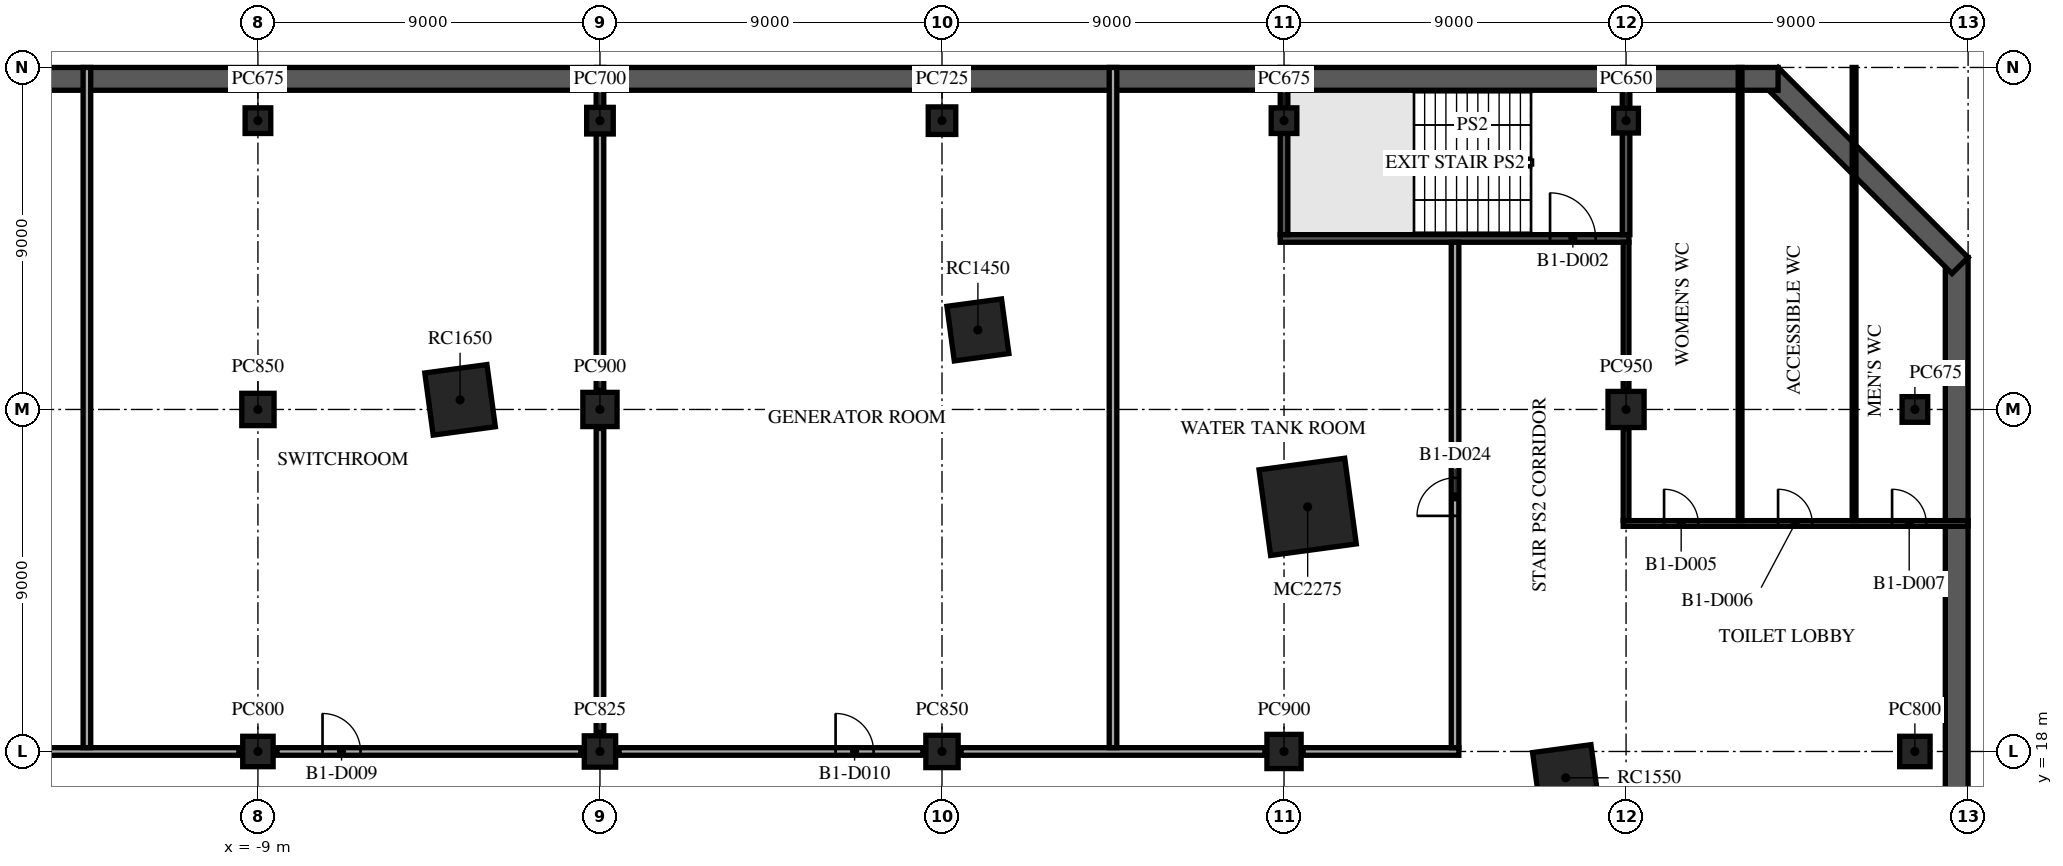
"""IFC4 building model, lengths in metres.
Left out: names, types, materials, properties, quantities, classifications, styles, units other than length and angle.
Written with IfcOpenShell. Run it as: python <this file> out.ifc"""

import sys

from ifc_helpers import new_model, si_unit, direction, frame, frame_2d, origin, origin_2d, place, context, subcontext, project, spatial, rectangle, extrude, element, fill, save


model = new_model("IFC4")
c1 = context("Model", 3, precision=1e-05, world=origin(), true_north=direction((0.0, 1.0)))
c2 = subcontext(c1, "Body", "Model", "MODEL_VIEW")
j1 = project(units=[si_unit("LENGTHUNIT", "METRE"), si_unit("PLANEANGLEUNIT", "RADIAN")], contexts=[c1])
p1 = place(None, origin())
s1 = spatial("IfcSite", under=j1, at=p1, CompositionType="ELEMENT")
p2 = place(p1, origin())
s2 = spatial("IfcBuilding", under=s1, at=p2, CompositionType="ELEMENT")
p3 = place(p2, frame((0.0, 0.0, -4.5)))
s3 = spatial("IfcBuildingStorey", under=s2, at=p3, CompositionType="ELEMENT", Elevation=-4.5)
p4 = place(p3, frame((35.7, -31.0, -0.3), z_axis=(0.0, 0.0, 1.0), x_axis=(0.0, 1.0, 0.0)))
e1 = element("IfcWall", 1, at=p4, inside=s3, PredefinedType="SOLIDWALL", context=c2, shape_type="SweptSolid", body=[
    extrude(rectangle(XDim=62.0, YDim=0.6, at=frame_2d((31.0, 0.0))), origin(), (0.0, 0.0, 1.0), 4.4),
])
p5 = place(p3, frame((35.788, 30.788, -0.3), z_axis=(0.0, 0.0, 1.0), x_axis=(-0.707106781187, 0.707106781187, 0.0)))
e2 = element("IfcWall", 2, at=p5, inside=s3, PredefinedType="SOLIDWALL", context=c2, shape_type="SweptSolid", body=[
    extrude(rectangle(XDim=7.071, YDim=0.6, at=frame_2d((3.536, 0.0))), origin(), (0.0, 0.0, 1.0), 4.4),
])
p6 = place(p3, frame((31.0, 35.7, -0.3), z_axis=(0.0, 0.0, 1.0), x_axis=(-1.0, 0.0, 0.0)))
e3 = element("IfcWall", 3, at=p6, inside=s3, PredefinedType="SOLIDWALL", context=c2, shape_type="SweptSolid", body=[
    extrude(rectangle(XDim=62.0, YDim=0.6, at=frame_2d((31.0, 0.0))), origin(), (0.0, 0.0, 1.0), 4.4),
])
p7 = place(p3, frame((-9.0, 18.0, 0.0), z_axis=(0.0, 0.0, 1.0), x_axis=(1.0, 0.0, 0.0)))
e4 = element("IfcColumn", 4, at=p7, inside=s3, PredefinedType="COLUMN", context=c2, shape_type="SweptSolid", body=[
    extrude(rectangle(XDim=0.8, YDim=0.8, at=origin_2d()), origin(), (0.0, 0.0, 1.0), 4.5),
])
p8 = place(p3, frame((-9.0, 27.0, 0.0), z_axis=(0.0, 0.0, 1.0), x_axis=(1.0, 0.0, 0.0)))
e5 = element("IfcColumn", 5, at=p8, inside=s3, PredefinedType="COLUMN", context=c2, shape_type="SweptSolid", body=[
    extrude(rectangle(XDim=0.85, YDim=0.85, at=origin_2d()), origin(), (0.0, 0.0, 1.0), 4.5),
])
p9 = place(p3, frame((-9.0, 34.6, 0.0), z_axis=(0.0, 0.0, 1.0), x_axis=(1.0, 0.0, 0.0)))
e6 = element("IfcColumn", 6, at=p9, inside=s3, PredefinedType="COLUMN", context=c2, shape_type="SweptSolid", body=[
    extrude(rectangle(XDim=0.675, YDim=0.675, at=origin_2d()), origin(), (0.0, 0.0, 1.0), 4.5),
])
p10 = place(p3, frame((0.0, 18.0, 0.0), z_axis=(0.0, 0.0, 1.0), x_axis=(1.0, 0.0, 0.0)))
e7 = element("IfcColumn", 7, at=p10, inside=s3, PredefinedType="COLUMN", context=c2, shape_type="SweptSolid", body=[
    extrude(rectangle(XDim=0.825, YDim=0.825, at=origin_2d()), origin(), (0.0, 0.0, 1.0), 4.5),
])
p11 = place(p3, frame((0.0, 27.0, 0.0), z_axis=(0.0, 0.0, 1.0), x_axis=(1.0, 0.0, 0.0)))
e8 = element("IfcColumn", 8, at=p11, inside=s3, PredefinedType="COLUMN", context=c2, shape_type="SweptSolid", body=[
    extrude(rectangle(XDim=0.9, YDim=0.9, at=origin_2d()), origin(), (0.0, 0.0, 1.0), 4.5),
])
p12 = place(p3, frame((0.0, 34.6, 0.0), z_axis=(0.0, 0.0, 1.0), x_axis=(1.0, 0.0, 0.0)))
e9 = element("IfcColumn", 9, at=p12, inside=s3, PredefinedType="COLUMN", context=c2, shape_type="SweptSolid", body=[
    extrude(rectangle(XDim=0.7, YDim=0.7, at=origin_2d()), origin(), (0.0, 0.0, 1.0), 4.5),
])
p13 = place(p3, frame((9.0, 18.0, 0.0), z_axis=(0.0, 0.0, 1.0), x_axis=(1.0, 0.0, 0.0)))
e10 = element("IfcColumn", 10, at=p13, inside=s3, PredefinedType="COLUMN", context=c2, shape_type="SweptSolid", body=[
    extrude(rectangle(XDim=0.85, YDim=0.85, at=origin_2d()), origin(), (0.0, 0.0, 1.0), 4.5),
])
p14 = place(p3, frame((9.0, 34.6, 0.0), z_axis=(0.0, 0.0, 1.0), x_axis=(1.0, 0.0, 0.0)))
e11 = element("IfcColumn", 11, at=p14, inside=s3, PredefinedType="COLUMN", context=c2, shape_type="SweptSolid", body=[
    extrude(rectangle(XDim=0.725, YDim=0.725, at=origin_2d()), origin(), (0.0, 0.0, 1.0), 4.5),
])
p15 = place(p3, frame((18.0, 18.0, 0.0), z_axis=(0.0, 0.0, 1.0), x_axis=(1.0, 0.0, 0.0)))
e12 = element("IfcColumn", 12, at=p15, inside=s3, PredefinedType="COLUMN", context=c2, shape_type="SweptSolid", body=[
    extrude(rectangle(XDim=0.9, YDim=0.9, at=origin_2d()), origin(), (0.0, 0.0, 1.0), 4.5),
])
p16 = place(p3, frame((18.0, 34.6, 0.0), z_axis=(0.0, 0.0, 1.0), x_axis=(1.0, 0.0, 0.0)))
e13 = element("IfcColumn", 13, at=p16, inside=s3, PredefinedType="COLUMN", context=c2, shape_type="SweptSolid", body=[
    extrude(rectangle(XDim=0.675, YDim=0.675, at=origin_2d()), origin(), (0.0, 0.0, 1.0), 4.5),
])
p17 = place(p3, frame((27.0, 27.0, 0.0), z_axis=(0.0, 0.0, 1.0), x_axis=(1.0, 0.0, 0.0)))
e14 = element("IfcColumn", 14, at=p17, inside=s3, PredefinedType="COLUMN", context=c2, shape_type="SweptSolid", body=[
    extrude(rectangle(XDim=0.95, YDim=0.95, at=origin_2d()), origin(), (0.0, 0.0, 1.0), 4.5),
])
p18 = place(p3, frame((27.0, 34.6, 0.0), z_axis=(0.0, 0.0, 1.0), x_axis=(1.0, 0.0, 0.0)))
e15 = element("IfcColumn", 15, at=p18, inside=s3, PredefinedType="COLUMN", context=c2, shape_type="SweptSolid", body=[
    extrude(rectangle(XDim=0.65, YDim=0.65, at=origin_2d()), origin(), (0.0, 0.0, 1.0), 4.5),
])
p19 = place(p3, frame((34.6, 18.0, 0.0), z_axis=(0.0, 0.0, 1.0), x_axis=(1.0, 0.0, 0.0)))
e16 = element("IfcColumn", 16, at=p19, inside=s3, PredefinedType="COLUMN", context=c2, shape_type="SweptSolid", body=[
    extrude(rectangle(XDim=0.8, YDim=0.8, at=origin_2d()), origin(), (0.0, 0.0, 1.0), 4.5),
])
p20 = place(p3, frame((34.6, 27.0, 0.0), z_axis=(0.0, 0.0, 1.0), x_axis=(1.0, 0.0, 0.0)))
e17 = element("IfcColumn", 17, at=p20, inside=s3, PredefinedType="COLUMN", context=c2, shape_type="SweptSolid", body=[
    extrude(rectangle(XDim=0.675, YDim=0.675, at=origin_2d()), origin(), (0.0, 0.0, 1.0), 4.5),
])
p21 = place(p3, frame((18.622, 24.437, 0.0), z_axis=(0.0, 0.0, 1.0), x_axis=(0.991001197216, 0.133853005627, 0.0)))
e18 = element("IfcColumn", 18, at=p21, inside=s3, PredefinedType="COLUMN", context=c2, shape_type="SweptSolid", body=[
    extrude(rectangle(XDim=2.275, YDim=2.275, at=origin_2d()), origin(), (0.0, 0.0, 1.0), 4.5),
])
p22 = place(p3, frame((9.945, 29.093, 0.0), z_axis=(0.0, 0.0, 1.0), x_axis=(0.991001197216, 0.133853005627, 0.0)))
e19 = element("IfcColumn", 19, at=p22, inside=s3, PredefinedType="COLUMN", context=c2, shape_type="SweptSolid", body=[
    extrude(rectangle(XDim=1.45, YDim=1.45, at=origin_2d()), origin(), (0.0, 0.0, 1.0), 4.5),
])
p23 = place(p3, frame((-3.681, 27.253, 0.0), z_axis=(0.0, 0.0, 1.0), x_axis=(0.991001197216, 0.133853005627, 0.0)))
e20 = element("IfcColumn", 20, at=p23, inside=s3, PredefinedType="COLUMN", context=c2, shape_type="SweptSolid", body=[
    extrude(rectangle(XDim=1.65, YDim=1.65, at=origin_2d()), origin(), (0.0, 0.0, 1.0), 4.5),
])
p24 = place(p3, frame((25.412, 17.307, 0.0), z_axis=(0.0, 0.0, 1.0), x_axis=(0.991001197216, 0.133853005627, 0.0)))
e21 = element("IfcColumn", 21, at=p24, inside=s3, PredefinedType="COLUMN", context=c2, shape_type="SweptSolid", body=[
    extrude(rectangle(XDim=1.55, YDim=1.55, at=origin_2d()), origin(), (0.0, 0.0, 1.0), 4.5),
])
p25 = place(p3, frame((-17.5, 18.0, 0.0), z_axis=(0.0, 0.0, 1.0), x_axis=(1.0, 0.0, 0.0)))
e22 = element("IfcWall", 22, at=p25, inside=s3, PredefinedType="PARTITIONING", context=c2, shape_type="SweptSolid", body=[
    extrude(rectangle(XDim=8.0, YDim=0.2, at=frame_2d((4.0, 0.0))), origin(), (0.0, 0.0, 1.0), 4.1),
])
p26 = place(p3, frame((-8.5, 18.0, 0.0), z_axis=(0.0, 0.0, 1.0), x_axis=(1.0, 0.0, 0.0)))
e23 = element("IfcWall", 23, at=p26, inside=s3, PredefinedType="PARTITIONING", context=c2, shape_type="SweptSolid", body=[
    extrude(rectangle(XDim=8.0, YDim=0.2, at=frame_2d((4.0, 0.0))), origin(), (0.0, 0.0, 1.0), 4.1),
])
p27 = place(p26, frame((1.2, 0.0, 0.0)))
e24 = element("IfcOpeningElement", 24, at=p27, cuts=e23, PredefinedType="OPENING", context=c2, shape_type="SweptSolid", body=[
    extrude(rectangle(XDim=1.0, YDim=2.1, at=frame_2d((0.5, 1.05))), frame((0.0, 0.11, 0.0), z_axis=(0.0, -1.0, 0.0), x_axis=(1.0, 0.0, 0.0)), (0.0, 0.0, 1.0), 0.22),
])
p28 = place(p3, frame((0.5, 18.0, 0.0), z_axis=(0.0, 0.0, 1.0), x_axis=(1.0, 0.0, 0.0)))
e25 = element("IfcWall", 25, at=p28, inside=s3, PredefinedType="PARTITIONING", context=c2, shape_type="SweptSolid", body=[
    extrude(rectangle(XDim=8.0, YDim=0.2, at=frame_2d((4.0, 0.0))), origin(), (0.0, 0.0, 1.0), 4.1),
])
p29 = place(p28, frame((5.7, 0.0, 0.0)))
e26 = element("IfcOpeningElement", 26, at=p29, cuts=e25, PredefinedType="OPENING", context=c2, shape_type="SweptSolid", body=[
    extrude(rectangle(XDim=1.0, YDim=2.1, at=frame_2d((0.5, 1.05))), frame((0.0, 0.11, 0.0), z_axis=(0.0, -1.0, 0.0), x_axis=(1.0, 0.0, 0.0)), (0.0, 0.0, 1.0), 0.22),
])
p30 = place(p3, frame((9.5, 18.0, 0.0), z_axis=(0.0, 0.0, 1.0), x_axis=(1.0, 0.0, 0.0)))
e27 = element("IfcWall", 27, at=p30, inside=s3, PredefinedType="PARTITIONING", context=c2, shape_type="SweptSolid", body=[
    extrude(rectangle(XDim=8.0, YDim=0.2, at=frame_2d((4.0, 0.0))), origin(), (0.0, 0.0, 1.0), 4.1),
])
p31 = place(p3, frame((18.5, 18.0, 0.0), z_axis=(0.0, 0.0, 1.0), x_axis=(1.0, 0.0, 0.0)))
e28 = element("IfcWall", 28, at=p31, inside=s3, PredefinedType="PARTITIONING", context=c2, shape_type="SweptSolid", body=[
    extrude(rectangle(XDim=4.1, YDim=0.2, at=frame_2d((2.05, 0.0))), origin(), (0.0, 0.0, 1.0), 4.1),
])
p32 = place(p3, frame((26.925, 24.0, 0.0), z_axis=(0.0, 0.0, 1.0), x_axis=(1.0, 0.0, 0.0)))
e29 = element("IfcWall", 29, at=p32, inside=s3, PredefinedType="PARTITIONING", context=c2, shape_type="SweptSolid", body=[
    extrude(rectangle(XDim=9.075, YDim=0.15, at=frame_2d((4.538, 0.0))), origin(), (0.0, 0.0, 1.0), 4.1),
])
p33 = place(p32, frame((1.075, 0.0, 0.0)))
e30 = element("IfcOpeningElement", 30, at=p33, cuts=e29, PredefinedType="OPENING", context=c2, shape_type="SweptSolid", body=[
    extrude(rectangle(XDim=0.9, YDim=2.1, at=frame_2d((0.45, 1.05))), frame((0.0, 0.085, 0.0), z_axis=(0.0, -1.0, 0.0), x_axis=(1.0, 0.0, 0.0)), (0.0, 0.0, 1.0), 0.17),
])
p34 = place(p32, frame((4.075, 0.0, 0.0)))
e31 = element("IfcOpeningElement", 31, at=p34, cuts=e29, PredefinedType="OPENING", context=c2, shape_type="SweptSolid", body=[
    extrude(rectangle(XDim=0.9, YDim=2.1, at=frame_2d((0.45, 1.05))), frame((0.0, 0.085, 0.0), z_axis=(0.0, -1.0, 0.0), x_axis=(1.0, 0.0, 0.0)), (0.0, 0.0, 1.0), 0.17),
])
p35 = place(p32, frame((7.075, 0.0, 0.0)))
e32 = element("IfcOpeningElement", 32, at=p35, cuts=e29, PredefinedType="OPENING", context=c2, shape_type="SweptSolid", body=[
    extrude(rectangle(XDim=0.9, YDim=2.1, at=frame_2d((0.45, 1.05))), frame((0.0, 0.085, 0.0), z_axis=(0.0, -1.0, 0.0), x_axis=(1.0, 0.0, 0.0)), (0.0, 0.0, 1.0), 0.17),
])
p36 = place(p3, frame((17.9, 31.5, 0.0), z_axis=(0.0, 0.0, 1.0), x_axis=(1.0, 0.0, 0.0)))
e33 = element("IfcWall", 33, at=p36, inside=s3, PredefinedType="PARTITIONING", context=c2, shape_type="SweptSolid", body=[
    extrude(rectangle(XDim=9.175, YDim=0.2, at=frame_2d((4.587, 0.0))), origin(), (0.0, 0.0, 1.0), 4.1),
])
p37 = place(p36, frame((7.1, 0.0, 0.0)))
e34 = element("IfcOpeningElement", 34, at=p37, cuts=e33, PredefinedType="OPENING", context=c2, shape_type="SweptSolid", body=[
    extrude(rectangle(XDim=1.2, YDim=2.1, at=frame_2d((0.6, 1.05))), frame((0.0, 0.11, 0.0), z_axis=(0.0, -1.0, 0.0), x_axis=(1.0, 0.0, 0.0)), (0.0, 0.0, 1.0), 0.22),
])
p38 = place(p3, frame((-13.5, 18.1, 0.0), z_axis=(0.0, 0.0, 1.0), x_axis=(0.0, 1.0, 0.0)))
e35 = element("IfcWall", 35, at=p38, inside=s3, PredefinedType="PARTITIONING", context=c2, shape_type="SweptSolid", body=[
    extrude(rectangle(XDim=17.9, YDim=0.2, at=frame_2d((8.95, 0.0))), origin(), (0.0, 0.0, 1.0), 4.1),
])
p39 = place(p3, frame((0.0, 18.5, 0.0), z_axis=(0.0, 0.0, 1.0), x_axis=(0.0, 1.0, 0.0)))
e36 = element("IfcWall", 36, at=p39, inside=s3, PredefinedType="PARTITIONING", context=c2, shape_type="SweptSolid", body=[
    extrude(rectangle(XDim=8.0, YDim=0.2, at=frame_2d((4.0, 0.0))), origin(), (0.0, 0.0, 1.0), 4.1),
])
p40 = place(p3, frame((0.0, 27.5, 0.0), z_axis=(0.0, 0.0, 1.0), x_axis=(0.0, 1.0, 0.0)))
e37 = element("IfcWall", 37, at=p40, inside=s3, PredefinedType="PARTITIONING", context=c2, shape_type="SweptSolid", body=[
    extrude(rectangle(XDim=8.5, YDim=0.2, at=frame_2d((4.25, 0.0))), origin(), (0.0, 0.0, 1.0), 4.1),
])
p41 = place(p3, frame((13.5, 18.1, 0.0), z_axis=(0.0, 0.0, 1.0), x_axis=(0.0, 1.0, 0.0)))
e38 = element("IfcWall", 38, at=p41, inside=s3, PredefinedType="PARTITIONING", context=c2, shape_type="SweptSolid", body=[
    extrude(rectangle(XDim=17.9, YDim=0.2, at=frame_2d((8.95, 0.0))), origin(), (0.0, 0.0, 1.0), 4.1),
])
p42 = place(p3, frame((18.0, 31.6, 0.0), z_axis=(0.0, 0.0, 1.0), x_axis=(0.0, 1.0, 0.0)))
e39 = element("IfcWall", 39, at=p42, inside=s3, PredefinedType="PARTITIONING", context=c2, shape_type="SweptSolid", body=[
    extrude(rectangle(XDim=4.4, YDim=0.2, at=frame_2d((2.2, 0.0))), origin(), (0.0, 0.0, 1.0), 4.1),
])
p43 = place(p3, frame((22.5, 18.1, 0.0), z_axis=(0.0, 0.0, 1.0), x_axis=(0.0, 1.0, 0.0)))
e40 = element("IfcWall", 40, at=p43, inside=s3, PredefinedType="PARTITIONING", context=c2, shape_type="SweptSolid", body=[
    extrude(rectangle(XDim=13.3, YDim=0.2, at=frame_2d((6.65, 0.0))), origin(), (0.0, 0.0, 1.0), 4.1),
])
p44 = place(p43, frame((6.1, 0.0, 0.0)))
e41 = element("IfcOpeningElement", 41, at=p44, cuts=e40, PredefinedType="OPENING", context=c2, shape_type="SweptSolid", body=[
    extrude(rectangle(XDim=1.0, YDim=2.1, at=frame_2d((0.5, 1.05))), frame((0.0, 0.11, 0.0), z_axis=(0.0, -1.0, 0.0), x_axis=(1.0, 0.0, 0.0)), (0.0, 0.0, 1.0), 0.22),
])
p45 = place(p3, frame((27.0, 24.075, 0.0), z_axis=(0.0, 0.0, 1.0), x_axis=(0.0, 1.0, 0.0)))
e42 = element("IfcWall", 42, at=p45, inside=s3, PredefinedType="PARTITIONING", context=c2, shape_type="SweptSolid", body=[
    extrude(rectangle(XDim=2.425, YDim=0.15, at=frame_2d((1.212, 0.0))), origin(), (0.0, 0.0, 1.0), 4.1),
])
p46 = place(p3, frame((27.0, 27.5, 0.0), z_axis=(0.0, 0.0, 1.0), x_axis=(0.0, 1.0, 0.0)))
e43 = element("IfcWall", 43, at=p46, inside=s3, PredefinedType="PARTITIONING", context=c2, shape_type="SweptSolid", body=[
    extrude(rectangle(XDim=3.9, YDim=0.15, at=frame_2d((1.95, 0.0))), origin(), (0.0, 0.0, 1.0), 4.1),
])
p47 = place(p3, frame((27.0, 31.6, 0.0), z_axis=(0.0, 0.0, 1.0), x_axis=(0.0, 1.0, 0.0)))
e44 = element("IfcWall", 44, at=p47, inside=s3, PredefinedType="PARTITIONING", context=c2, shape_type="SweptSolid", body=[
    extrude(rectangle(XDim=4.4, YDim=0.2, at=frame_2d((2.2, 0.0))), origin(), (0.0, 0.0, 1.0), 4.1),
])
for number, where, z_axis, x_axis in (
    (45, (30.0, 24.075, 0.0), (0.0, 0.0, 1.0), (0.0, 1.0, 0.0)),
    (46, (33.0, 24.075, 0.0), (0.0, 0.0, 1.0), (0.0, 1.0, 0.0)),
):
    element("IfcWall", number, at=place(p3, frame(where, z_axis=z_axis, x_axis=x_axis)), inside=s3, PredefinedType="PARTITIONING", context=c2, shape_type="SweptSolid", body=[
        extrude(rectangle(XDim=11.925, YDim=0.1, at=frame_2d((5.962, 0.0))), origin(), (0.0, 0.0, 1.0), 4.1),
    ])
p48 = place(p37, origin())
e47 = element("IfcDoor", 47, at=p48, inside=s3, OperationType="SINGLE_SWING_RIGHT", PredefinedType="DOOR", context=c2, shape_type="SweptSolid", body=[
    extrude(rectangle(XDim=1.2, YDim=2.1, at=frame_2d((0.6, 1.05))), frame((0.0, 0.025, 0.0), z_axis=(0.0, -1.0, 0.0), x_axis=(1.0, 0.0, 0.0)), (0.0, 0.0, 1.0), 0.05),
])
fill(e34, e47)
p49 = place(p33, origin())
e48 = element("IfcDoor", 48, at=p49, inside=s3, OperationType="SINGLE_SWING_LEFT", PredefinedType="DOOR", context=c2, shape_type="SweptSolid", body=[
    extrude(rectangle(XDim=0.9, YDim=2.1, at=frame_2d((0.45, 1.05))), frame((0.0, 0.025, 0.0), z_axis=(0.0, -1.0, 0.0), x_axis=(1.0, 0.0, 0.0)), (0.0, 0.0, 1.0), 0.05),
])
fill(e30, e48)
p50 = place(p34, origin())
e49 = element("IfcDoor", 49, at=p50, inside=s3, OperationType="SINGLE_SWING_RIGHT", PredefinedType="DOOR", context=c2, shape_type="SweptSolid", body=[
    extrude(rectangle(XDim=0.9, YDim=2.1, at=frame_2d((0.45, 1.05))), frame((0.0, 0.025, 0.0), z_axis=(0.0, -1.0, 0.0), x_axis=(1.0, 0.0, 0.0)), (0.0, 0.0, 1.0), 0.05),
])
fill(e31, e49)
p51 = place(p35, origin())
e50 = element("IfcDoor", 50, at=p51, inside=s3, OperationType="SINGLE_SWING_LEFT", PredefinedType="DOOR", context=c2, shape_type="SweptSolid", body=[
    extrude(rectangle(XDim=0.9, YDim=2.1, at=frame_2d((0.45, 1.05))), frame((0.0, 0.025, 0.0), z_axis=(0.0, -1.0, 0.0), x_axis=(1.0, 0.0, 0.0)), (0.0, 0.0, 1.0), 0.05),
])
fill(e32, e50)
p52 = place(p27, origin())
e51 = element("IfcDoor", 51, at=p52, inside=s3, OperationType="SINGLE_SWING_LEFT", PredefinedType="DOOR", context=c2, shape_type="SweptSolid", body=[
    extrude(rectangle(XDim=1.0, YDim=2.1, at=frame_2d((0.5, 1.05))), frame((0.0, 0.025, 0.0), z_axis=(0.0, -1.0, 0.0), x_axis=(1.0, 0.0, 0.0)), (0.0, 0.0, 1.0), 0.05),
])
fill(e24, e51)
p53 = place(p29, origin())
e52 = element("IfcDoor", 52, at=p53, inside=s3, OperationType="SINGLE_SWING_RIGHT", PredefinedType="DOOR", context=c2, shape_type="SweptSolid", body=[
    extrude(rectangle(XDim=1.0, YDim=2.1, at=frame_2d((0.5, 1.05))), frame((0.0, 0.025, 0.0), z_axis=(0.0, -1.0, 0.0), x_axis=(1.0, 0.0, 0.0)), (0.0, 0.0, 1.0), 0.05),
])
fill(e26, e52)
p54 = place(p44, origin())
e53 = element("IfcDoor", 53, at=p54, inside=s3, OperationType="SINGLE_SWING_RIGHT", PredefinedType="DOOR", context=c2, shape_type="SweptSolid", body=[
    extrude(rectangle(XDim=1.0, YDim=2.1, at=frame_2d((0.5, 1.05))), frame((0.0, 0.025, 0.0), z_axis=(0.0, -1.0, 0.0), x_axis=(1.0, 0.0, 0.0)), (0.0, 0.0, 1.0), 0.05),
])
fill(e41, e53)
save(model, sys.argv[1])
